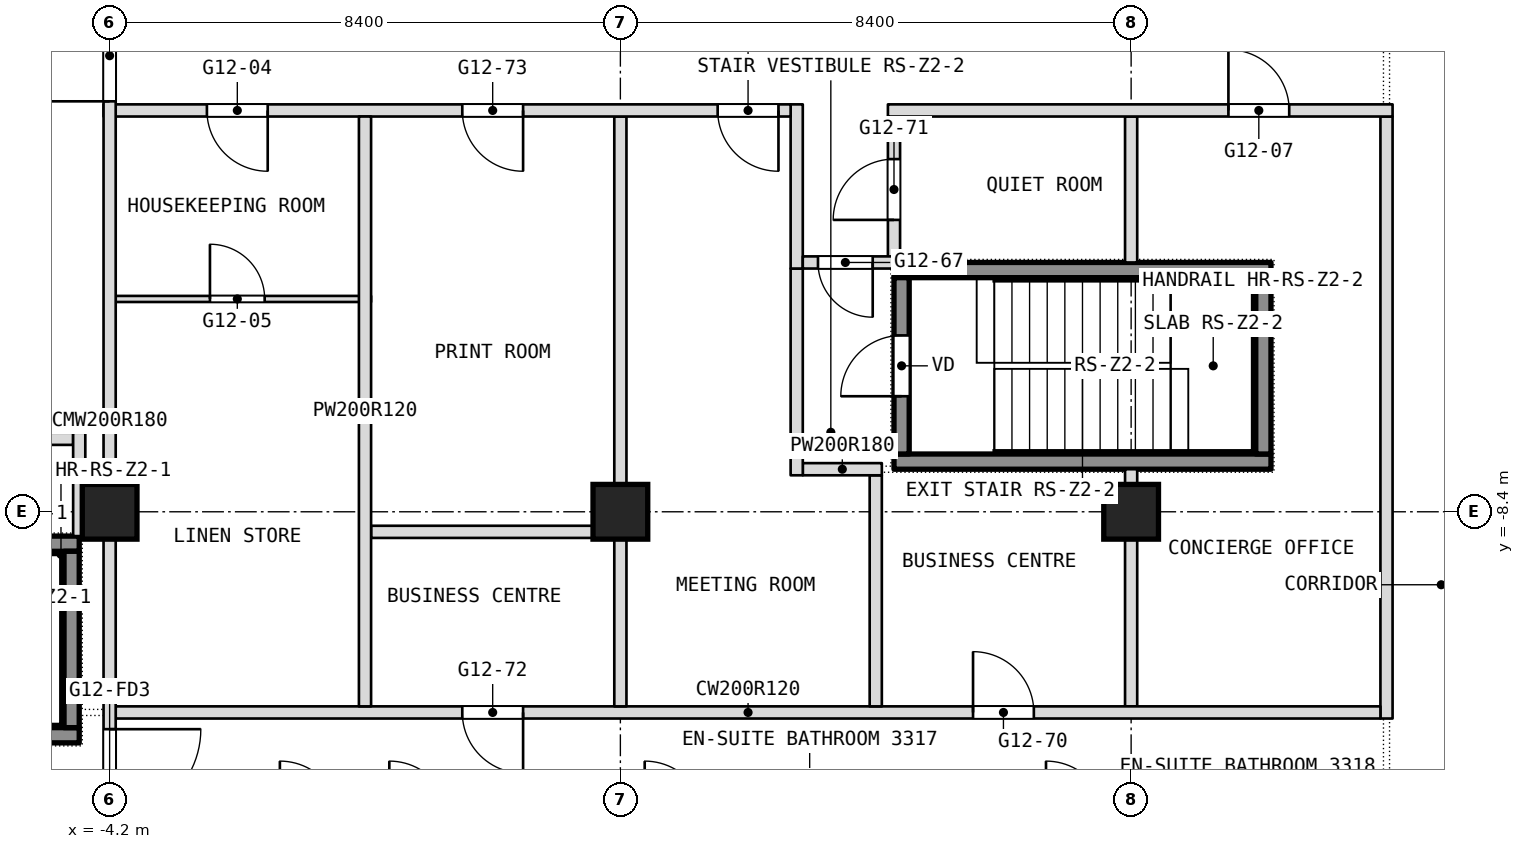
"""IFC4 building model, lengths in metres.
Left out: names, types, materials, properties, quantities, classifications, styles, units other than length and angle.
Written with IfcOpenShell. Run it as: python <this file> out.ifc"""

import sys

from ifc_helpers import new_model, si_unit, direction, frame, frame_2d, origin, origin_2d, place, context, subcontext, project, spatial, rectangle, extrude, element, fill, save


model = new_model("IFC4")
c1 = context("Model", 3, precision=1e-05, world=origin(), true_north=direction((0.0, 1.0)))
c2 = subcontext(c1, "Body", "Model", "MODEL_VIEW")
j1 = project(units=[si_unit("LENGTHUNIT", "METRE"), si_unit("PLANEANGLEUNIT", "RADIAN")], contexts=[c1])
p1 = place(None, origin())
s1 = spatial("IfcSite", under=j1, at=p1, CompositionType="ELEMENT")
p2 = place(p1, origin())
s2 = spatial("IfcBuilding", under=s1, at=p2, CompositionType="ELEMENT")
p3 = place(p2, frame((0.0, 0.0, 144.5)))
s3 = spatial("IfcBuildingStorey", under=s2, at=p3, CompositionType="ELEMENT", Elevation=144.5)
for number, where, z_axis, x_axis in (
    (1, (-4.2, -8.4, 0.0), (0.0, 0.0, 1.0), (1.0, 0.0, 0.0)),
    (2, (4.2, -8.4, 0.0), (0.0, 0.0, 1.0), (1.0, 0.0, 0.0)),
    (3, (12.6, -8.4, 0.0), (0.0, 0.0, 1.0), (1.0, 0.0, 0.0)),
):
    element("IfcColumn", number, at=place(p3, frame(where, z_axis=z_axis, x_axis=x_axis)), inside=s3, PredefinedType="COLUMN", context=c2, shape_type="SweptSolid", body=[
        extrude(rectangle(XDim=0.9, YDim=0.9, at=origin_2d()), origin(), (0.0, 0.0, 1.0), 3.6),
    ])
p4 = place(p3, frame((16.8, -11.8, 0.0), z_axis=(0.0, 0.0, 1.0), x_axis=(0.0, 1.0, 0.0)))
e4 = element("IfcWall", 4, at=p4, inside=s3, PredefinedType="PARTITIONING", context=c2, shape_type="SweptSolid", body=[
    extrude(rectangle(XDim=9.9, YDim=0.2, at=frame_2d((4.95, 0.0))), origin(), (0.0, 0.0, 1.0), 3.34),
])
p5 = place(p3, frame((12.6, -11.6, 0.0), z_axis=(0.0, 0.0, 1.0), x_axis=(0.0, 1.0, 0.0)))
e5 = element("IfcWall", 5, at=p5, inside=s3, PredefinedType="PARTITIONING", context=c2, shape_type="SweptSolid", body=[
    extrude(rectangle(XDim=3.9, YDim=0.2, at=frame_2d((1.95, 0.0))), origin(), (0.0, 0.0, 1.0), 3.34),
])
p6 = place(p3, frame((12.6, -4.3, 0.0), z_axis=(0.0, 0.0, 1.0), x_axis=(0.0, 1.0, 0.0)))
e6 = element("IfcWall", 6, at=p6, inside=s3, PredefinedType="PARTITIONING", context=c2, shape_type="SweptSolid", body=[
    extrude(rectangle(XDim=2.4, YDim=0.2, at=frame_2d((1.2, 0.0))), origin(), (0.0, 0.0, 1.0), 3.34),
])
p7 = place(p3, frame((-4.1, -11.7, 0.0), z_axis=(0.0, 0.0, 1.0), x_axis=(1.0, 0.0, 0.0)))
e7 = element("IfcWall", 7, at=p7, inside=s3, PredefinedType="PARTITIONING", context=c2, shape_type="SweptSolid", body=[
    extrude(rectangle(XDim=20.8, YDim=0.2, at=frame_2d((10.4, 0.0))), origin(), (0.0, 0.0, 1.0), 3.34),
])
p8 = place(p7, frame((14.1, 0.0, 0.0)))
e8 = element("IfcOpeningElement", 8, at=p8, cuts=e7, PredefinedType="OPENING", context=c2, shape_type="SweptSolid", body=[
    extrude(rectangle(XDim=1.0, YDim=2.1, at=frame_2d((0.5, 1.05))), frame((0.0, 0.1, 0.0), z_axis=(0.0, -1.0, 0.0), x_axis=(1.0, 0.0, 0.0)), (0.0, 0.0, 1.0), 0.2),
])
p9 = place(p7, frame((5.7, 0.0, 0.0)))
e9 = element("IfcOpeningElement", 9, at=p9, cuts=e7, PredefinedType="OPENING", context=c2, shape_type="SweptSolid", body=[
    extrude(rectangle(XDim=1.0, YDim=2.1, at=frame_2d((0.5, 1.05))), frame((0.0, 0.1, 0.0), z_axis=(0.0, -1.0, 0.0), x_axis=(1.0, 0.0, 0.0)), (0.0, 0.0, 1.0), 0.2),
])
p10 = place(p3, frame((0.1, -8.73, 0.0), z_axis=(0.0, 0.0, 1.0), x_axis=(1.0, 0.0, 0.0)))
e10 = element("IfcWall", 10, at=p10, inside=s3, PredefinedType="PARTITIONING", context=c2, shape_type="SweptSolid", body=[
    extrude(rectangle(XDim=4.0, YDim=0.2, at=frame_2d((2.0, 0.0))), origin(), (0.0, 0.0, 1.0), 3.34),
])
p11 = place(p3, frame((8.7, -4.3, 0.0), z_axis=(0.0, 0.0, 1.0), x_axis=(0.0, 1.0, 0.0)))
e11 = element("IfcWall", 11, at=p11, inside=s3, PredefinedType="PARTITIONING", context=c2, shape_type="SweptSolid", body=[
    extrude(rectangle(XDim=2.4, YDim=0.2, at=frame_2d((1.2, 0.0))), origin(), (0.0, 0.0, 1.0), 3.34),
])
p12 = place(p11, frame((0.7, 0.0, 0.0)))
e12 = element("IfcOpeningElement", 12, at=p12, cuts=e11, PredefinedType="OPENING", context=c2, shape_type="SweptSolid", body=[
    extrude(rectangle(XDim=1.0, YDim=2.1, at=frame_2d((0.5, 1.05))), frame((0.0, 0.1, 0.0), z_axis=(0.0, -1.0, 0.0), x_axis=(1.0, 0.0, 0.0)), (0.0, 0.0, 1.0), 0.2),
])
p13 = place(p3, frame((8.4, -11.6, 0.0), z_axis=(0.0, 0.0, 1.0), x_axis=(0.0, 1.0, 0.0)))
e13 = element("IfcWall", 13, at=p13, inside=s3, PredefinedType="PARTITIONING", context=c2, shape_type="SweptSolid", body=[
    extrude(rectangle(XDim=3.8, YDim=0.2, at=frame_2d((1.9, 0.0))), origin(), (0.0, 0.0, 1.0), 3.34),
])
p14 = place(p3, frame((7.2, -7.7, 0.0), z_axis=(0.0, 0.0, 1.0), x_axis=(1.0, 0.0, 0.0)))
e14 = element("IfcWall", 14, at=p14, inside=s3, PredefinedType="PARTITIONING", context=c2, shape_type="SweptSolid", body=[
    extrude(rectangle(XDim=1.3, YDim=0.2, at=frame_2d((0.65, 0.0))), origin(), (0.0, 0.0, 1.0), 3.34),
])
p15 = place(p3, frame((-8.5, -7.2, 0.0), z_axis=(0.0, 0.0, 1.0), x_axis=(1.0, 0.0, 0.0)))
e15 = element("IfcWall", 15, at=p15, inside=s3, PredefinedType="PARTITIONING", context=c2, shape_type="SweptSolid", body=[
    extrude(rectangle(XDim=3.7, YDim=0.2, at=frame_2d((1.85, 0.0))), origin(), (0.0, 0.0, 1.0), 3.34),
])
p16 = place(p15, frame((0.25, 0.0, 0.0)))
e16 = element("IfcOpeningElement", 16, at=p16, cuts=e15, PredefinedType="OPENING", context=c2, shape_type="SweptSolid", body=[
    extrude(rectangle(XDim=0.9, YDim=2.1, at=frame_2d((0.45, 1.05))), frame((0.0, 0.1, 0.0), z_axis=(0.0, -1.0, 0.0), x_axis=(1.0, 0.0, 0.0)), (0.0, 0.0, 1.0), 0.2),
])
p17 = place(p3, frame((7.1, -7.8, 0.0), z_axis=(0.0, 0.0, 1.0), x_axis=(0.0, 1.0, 0.0)))
e17 = element("IfcWall", 17, at=p17, inside=s3, PredefinedType="PARTITIONING", context=c2, shape_type="SweptSolid", body=[
    extrude(rectangle(XDim=3.4, YDim=0.2, at=frame_2d((1.7, 0.0))), origin(), (0.0, 0.0, 1.0), 3.34),
])
p18 = place(p3, frame((7.1, -4.4, 0.0), z_axis=(0.0, 0.0, 1.0), x_axis=(0.0, 1.0, 0.0)))
e18 = element("IfcWall", 18, at=p18, inside=s3, PredefinedType="PARTITIONING", context=c2, shape_type="SweptSolid", body=[
    extrude(rectangle(XDim=2.7, YDim=0.2, at=frame_2d((1.35, 0.0))), origin(), (0.0, 0.0, 1.0), 3.34),
])
p19 = place(p3, frame((-4.1, -4.9, 0.0), z_axis=(0.0, 0.0, 1.0), x_axis=(1.0, 0.0, 0.0)))
e19 = element("IfcWall", 19, at=p19, inside=s3, PredefinedType="PARTITIONING", context=c2, shape_type="SweptSolid", body=[
    extrude(rectangle(XDim=4.2, YDim=0.1, at=frame_2d((2.1, 0.0))), origin(), (0.0, 0.0, 1.0), 3.34),
])
p20 = place(p19, frame((1.55, 0.0, 0.0)))
e20 = element("IfcOpeningElement", 20, at=p20, cuts=e19, PredefinedType="OPENING", context=c2, shape_type="SweptSolid", body=[
    extrude(rectangle(XDim=0.9, YDim=2.1, at=frame_2d((0.45, 1.05))), frame((0.0, 0.05, 0.0), z_axis=(0.0, -1.0, 0.0), x_axis=(1.0, 0.0, 0.0)), (0.0, 0.0, 1.0), 0.1),
])
p21 = place(p3, frame((7.2, -4.3, 0.0), z_axis=(0.0, 0.0, 1.0), x_axis=(1.0, 0.0, 0.0)))
e21 = element("IfcWall", 21, at=p21, inside=s3, PredefinedType="PARTITIONING", context=c2, shape_type="SweptSolid", body=[
    extrude(rectangle(XDim=1.5, YDim=0.2, at=frame_2d((0.75, 0.0))), origin(), (0.0, 0.0, 1.0), 3.34),
])
p22 = place(p21, frame((0.25, 0.0, 0.0)))
e22 = element("IfcOpeningElement", 22, at=p22, cuts=e21, PredefinedType="OPENING", context=c2, shape_type="SweptSolid", body=[
    extrude(rectangle(XDim=0.9, YDim=2.1, at=frame_2d((0.45, 1.05))), frame((0.0, 0.1, 0.0), z_axis=(0.0, -1.0, 0.0), x_axis=(1.0, 0.0, 0.0)), (0.0, 0.0, 1.0), 0.2),
])
p23 = place(p3, frame((4.2, -11.6, 0.0), z_axis=(0.0, 0.0, 1.0), x_axis=(0.0, 1.0, 0.0)))
e23 = element("IfcWall", 23, at=p23, inside=s3, PredefinedType="PARTITIONING", context=c2, shape_type="SweptSolid", body=[
    extrude(rectangle(XDim=9.7, YDim=0.2, at=frame_2d((4.85, 0.0))), origin(), (0.0, 0.0, 1.0), 3.34),
])
p24 = place(p3, frame((-4.3, -1.8, 0.0), z_axis=(0.0, 0.0, 1.0), x_axis=(1.0, 0.0, 0.0)))
e24 = element("IfcWall", 24, at=p24, inside=s3, PredefinedType="PARTITIONING", context=c2, shape_type="SweptSolid", body=[
    extrude(rectangle(XDim=11.3, YDim=0.2, at=frame_2d((5.65, 0.0))), origin(), (0.0, 0.0, 1.0), 3.34),
])
p25 = place(p24, frame((1.7, 0.0, 0.0)))
e25 = element("IfcOpeningElement", 25, at=p25, cuts=e24, PredefinedType="OPENING", context=c2, shape_type="SweptSolid", body=[
    extrude(rectangle(XDim=1.0, YDim=2.1, at=frame_2d((0.5, 1.05))), frame((0.0, 0.1, 0.0), z_axis=(0.0, -1.0, 0.0), x_axis=(1.0, 0.0, 0.0)), (0.0, 0.0, 1.0), 0.2),
])
p26 = place(p24, frame((10.1, 0.0, 0.0)))
e26 = element("IfcOpeningElement", 26, at=p26, cuts=e24, PredefinedType="OPENING", context=c2, shape_type="SweptSolid", body=[
    extrude(rectangle(XDim=1.0, YDim=2.1, at=frame_2d((0.5, 1.05))), frame((0.0, 0.1, 0.0), z_axis=(0.0, -1.0, 0.0), x_axis=(1.0, 0.0, 0.0)), (0.0, 0.0, 1.0), 0.2),
])
p27 = place(p24, frame((5.9, 0.0, 0.0)))
e27 = element("IfcOpeningElement", 27, at=p27, cuts=e24, PredefinedType="OPENING", context=c2, shape_type="SweptSolid", body=[
    extrude(rectangle(XDim=1.0, YDim=2.1, at=frame_2d((0.5, 1.05))), frame((0.0, 0.1, 0.0), z_axis=(0.0, -1.0, 0.0), x_axis=(1.0, 0.0, 0.0)), (0.0, 0.0, 1.0), 0.2),
])
p28 = place(p3, frame((8.6, -1.8, 0.0), z_axis=(0.0, 0.0, 1.0), x_axis=(1.0, 0.0, 0.0)))
e28 = element("IfcWall", 28, at=p28, inside=s3, PredefinedType="PARTITIONING", context=c2, shape_type="SweptSolid", body=[
    extrude(rectangle(XDim=8.3, YDim=0.2, at=frame_2d((4.15, 0.0))), origin(), (0.0, 0.0, 1.0), 3.34),
])
p29 = place(p28, frame((5.6, 0.0, 0.0)))
e29 = element("IfcOpeningElement", 29, at=p29, cuts=e28, PredefinedType="OPENING", context=c2, shape_type="SweptSolid", body=[
    extrude(rectangle(XDim=1.0, YDim=2.1, at=frame_2d((0.5, 1.05))), frame((0.0, 0.1, 0.0), z_axis=(0.0, -1.0, 0.0), x_axis=(1.0, 0.0, 0.0)), (0.0, 0.0, 1.0), 0.2),
])
p30 = place(p3, frame((0.0, -11.6, 0.0), z_axis=(0.0, 0.0, 1.0), x_axis=(0.0, 1.0, 0.0)))
e30 = element("IfcWall", 30, at=p30, inside=s3, PredefinedType="PARTITIONING", context=c2, shape_type="SweptSolid", body=[
    extrude(rectangle(XDim=9.7, YDim=0.2, at=frame_2d((4.85, 0.0))), origin(), (0.0, 0.0, 1.0), 3.34),
])
p31 = place(p3, frame((-4.2, -13.8, 0.0), z_axis=(0.0, 0.0, 1.0), x_axis=(0.0, 1.0, 0.0)))
e31 = element("IfcWall", 31, at=p31, inside=s3, PredefinedType="PARTITIONING", context=c2, shape_type="SweptSolid", body=[
    extrude(rectangle(XDim=13.8, YDim=0.2, at=frame_2d((6.9, 0.0))), origin(), (0.0, 0.0, 1.0), 3.34),
])
p32 = place(p31, frame((12.15, 0.0, 0.0)))
e32 = element("IfcOpeningElement", 32, at=p32, cuts=e31, PredefinedType="OPENING", context=c2, shape_type="SweptSolid", body=[
    extrude(rectangle(XDim=1.5, YDim=2.1, at=frame_2d((0.75, 1.05))), frame((0.0, 0.1, 0.0), z_axis=(0.0, -1.0, 0.0), x_axis=(1.0, 0.0, 0.0)), (0.0, 0.0, 1.0), 0.2),
])
p33 = place(p31, frame((0.325, 0.0, 0.0)))
e33 = element("IfcOpeningElement", 33, at=p33, cuts=e31, PredefinedType="OPENING", context=c2, shape_type="SweptSolid", body=[
    extrude(rectangle(XDim=1.5, YDim=2.1, at=frame_2d((0.75, 1.05))), frame((0.0, 0.1, 0.0), z_axis=(0.0, -1.0, 0.0), x_axis=(1.0, 0.0, 0.0)), (0.0, 0.0, 1.0), 0.2),
])
p34 = place(p3, frame((-4.7, -8.8, 0.0), z_axis=(0.0, 0.0, 1.0), x_axis=(0.0, 1.0, 0.0)))
e34 = element("IfcWall", 34, at=p34, inside=s3, PredefinedType="PARTITIONING", context=c2, shape_type="SweptSolid", body=[
    extrude(rectangle(XDim=1.7, YDim=0.2, at=frame_2d((0.85, 0.0))), origin(), (0.0, 0.0, 1.0), 3.34),
])
p35 = place(p3, frame((-10.9, -12.075, 0.1), z_axis=(0.0, 0.0, 1.0), x_axis=(1.0, 0.0, 0.0)))
e35 = element("IfcWall", 35, at=p35, inside=s3, PredefinedType="SHEAR", context=c2, shape_type="SweptSolid", body=[
    extrude(rectangle(XDim=6.2, YDim=0.25, at=frame_2d((3.1, 0.0))), origin(), (0.0, 0.0, 1.0), 3.6),
])
p36 = place(p3, frame((-10.9, -8.925, 0.1), z_axis=(0.0, 0.0, 1.0), x_axis=(1.0, 0.0, 0.0)))
e36 = element("IfcWall", 36, at=p36, inside=s3, PredefinedType="SHEAR", context=c2, shape_type="SweptSolid", body=[
    extrude(rectangle(XDim=6.2, YDim=0.25, at=frame_2d((3.1, 0.0))), origin(), (0.0, 0.0, 1.0), 3.6),
])
p37 = place(p36, frame((0.45, 0.0, 0.0)))
e37 = element("IfcOpeningElement", 37, at=p37, cuts=e36, PredefinedType="OPENING", context=c2, shape_type="SweptSolid", body=[
    extrude(rectangle(XDim=1.0, YDim=2.1, at=frame_2d((0.5, 1.05))), frame((0.0, 0.125, 0.0), z_axis=(0.0, -1.0, 0.0), x_axis=(1.0, 0.0, 0.0)), (0.0, 0.0, 1.0), 0.25),
])
p38 = place(p3, frame((-4.825, -11.95, 0.1), z_axis=(0.0, 0.0, 1.0), x_axis=(0.0, 1.0, 0.0)))
e38 = element("IfcWall", 38, at=p38, inside=s3, PredefinedType="SHEAR", context=c2, shape_type="SweptSolid", body=[
    extrude(rectangle(XDim=2.9, YDim=0.25, at=frame_2d((1.45, 0.0))), origin(), (0.0, 0.0, 1.0), 3.6),
])
for number, where, z_axis, x_axis in (
    (39, (8.7, -7.575, 0.1), (0.0, 0.0, 1.0), (1.0, 0.0, 0.0)),
    (40, (8.7, -4.425, 0.1), (0.0, 0.0, 1.0), (1.0, 0.0, 0.0)),
):
    element("IfcWall", number, at=place(p3, frame(where, z_axis=z_axis, x_axis=x_axis)), inside=s3, PredefinedType="SHEAR", context=c2, shape_type="SweptSolid", body=[
        extrude(rectangle(XDim=6.2, YDim=0.25, at=frame_2d((3.1, 0.0))), origin(), (0.0, 0.0, 1.0), 3.6),
    ])
p39 = place(p3, frame((8.825, -7.45, 0.1), z_axis=(0.0, 0.0, 1.0), x_axis=(0.0, 1.0, 0.0)))
e41 = element("IfcWall", 41, at=p39, inside=s3, PredefinedType="SHEAR", context=c2, shape_type="SweptSolid", body=[
    extrude(rectangle(XDim=2.9, YDim=0.25, at=frame_2d((1.45, 0.0))), origin(), (0.0, 0.0, 1.0), 3.6),
])
p40 = place(p39, frame((0.95, 0.0, 0.0)))
e42 = element("IfcOpeningElement", 42, at=p40, cuts=e41, PredefinedType="OPENING", context=c2, shape_type="SweptSolid", body=[
    extrude(rectangle(XDim=1.0, YDim=2.1, at=frame_2d((0.5, 1.05))), frame((0.0, 0.125, 0.0), z_axis=(0.0, -1.0, 0.0), x_axis=(1.0, 0.0, 0.0)), (0.0, 0.0, 1.0), 0.25),
])
p41 = place(p3, frame((14.775, -7.45, 0.1), z_axis=(0.0, 0.0, 1.0), x_axis=(0.0, 1.0, 0.0)))
e43 = element("IfcWall", 43, at=p41, inside=s3, PredefinedType="SHEAR", context=c2, shape_type="SweptSolid", body=[
    extrude(rectangle(XDim=2.9, YDim=0.25, at=frame_2d((1.45, 0.0))), origin(), (0.0, 0.0, 1.0), 3.6),
])
p42 = place(p8, origin())
e44 = element("IfcDoor", 44, at=p42, inside=s3, OperationType="SINGLE_SWING_RIGHT", PredefinedType="DOOR", context=c2, shape_type="SweptSolid", body=[
    extrude(rectangle(XDim=1.0, YDim=2.1, at=frame_2d((0.5, 1.05))), frame((0.0, 0.025, 0.0), z_axis=(0.0, -1.0, 0.0), x_axis=(1.0, 0.0, 0.0)), (0.0, 0.0, 1.0), 0.05),
])
fill(e8, e44)
p43 = place(p9, origin())
e45 = element("IfcDoor", 45, at=p43, inside=s3, OperationType="SINGLE_SWING_RIGHT", PredefinedType="DOOR", context=c2, shape_type="SweptSolid", body=[
    extrude(rectangle(XDim=1.0, YDim=2.1, at=frame_2d((0.5, 1.05))), frame((0.0, 0.025, 0.0), z_axis=(0.0, -1.0, 0.0), x_axis=(1.0, 0.0, 0.0)), (0.0, 0.0, 1.0), 0.05),
])
fill(e9, e45)
p44 = place(p12, origin())
e46 = element("IfcDoor", 46, at=p44, inside=s3, OperationType="SINGLE_SWING_LEFT", PredefinedType="DOOR", context=c2, shape_type="SweptSolid", body=[
    extrude(rectangle(XDim=1.0, YDim=2.1, at=frame_2d((0.5, 1.05))), frame((0.0, 0.025, 0.0), z_axis=(0.0, -1.0, 0.0), x_axis=(1.0, 0.0, 0.0)), (0.0, 0.0, 1.0), 0.05),
])
fill(e12, e46)
p45 = place(p20, origin())
e47 = element("IfcDoor", 47, at=p45, inside=s3, OperationType="SINGLE_SWING_LEFT", PredefinedType="DOOR", context=c2, shape_type="SweptSolid", body=[
    extrude(rectangle(XDim=0.9, YDim=2.1, at=frame_2d((0.45, 1.05))), frame((0.0, 0.025, 0.0), z_axis=(0.0, -1.0, 0.0), x_axis=(1.0, 0.0, 0.0)), (0.0, 0.0, 1.0), 0.05),
])
fill(e20, e47)
p46 = place(p22, origin())
e48 = element("IfcDoor", 48, at=p46, inside=s3, OperationType="SINGLE_SWING_LEFT", PredefinedType="DOOR", context=c2, shape_type="SweptSolid", body=[
    extrude(rectangle(XDim=0.9, YDim=2.1, at=frame_2d((0.45, 1.05))), frame((0.0, 0.025, 0.0), z_axis=(0.0, -1.0, 0.0), x_axis=(1.0, 0.0, 0.0)), (0.0, 0.0, 1.0), 0.05),
])
fill(e22, e48)
p47 = place(p25, origin())
e49 = element("IfcDoor", 49, at=p47, inside=s3, OperationType="SINGLE_SWING_RIGHT", PredefinedType="DOOR", context=c2, shape_type="SweptSolid", body=[
    extrude(rectangle(XDim=1.0, YDim=2.1, at=frame_2d((0.5, 1.05))), frame((0.0, 0.025, 0.0), z_axis=(0.0, -1.0, 0.0), x_axis=(1.0, 0.0, 0.0)), (0.0, 0.0, 1.0), 0.05),
])
fill(e25, e49)
p48 = place(p26, origin())
e50 = element("IfcDoor", 50, at=p48, inside=s3, OperationType="SINGLE_SWING_LEFT", PredefinedType="DOOR", context=c2, shape_type="SweptSolid", body=[
    extrude(rectangle(XDim=1.0, YDim=2.1, at=frame_2d((0.5, 1.05))), frame((0.0, 0.025, 0.0), z_axis=(0.0, -1.0, 0.0), x_axis=(1.0, 0.0, 0.0)), (0.0, 0.0, 1.0), 0.05),
])
fill(e26, e50)
p49 = place(p27, origin())
e51 = element("IfcDoor", 51, at=p49, inside=s3, OperationType="SINGLE_SWING_LEFT", PredefinedType="DOOR", context=c2, shape_type="SweptSolid", body=[
    extrude(rectangle(XDim=1.0, YDim=2.1, at=frame_2d((0.5, 1.05))), frame((0.0, 0.025, 0.0), z_axis=(0.0, -1.0, 0.0), x_axis=(1.0, 0.0, 0.0)), (0.0, 0.0, 1.0), 0.05),
])
fill(e27, e51)
p50 = place(p29, origin())
e52 = element("IfcDoor", 52, at=p50, inside=s3, OperationType="SINGLE_SWING_LEFT", PredefinedType="DOOR", context=c2, shape_type="SweptSolid", body=[
    extrude(rectangle(XDim=1.0, YDim=2.1, at=frame_2d((0.5, 1.05))), frame((0.0, 0.025, 0.0), z_axis=(0.0, -1.0, 0.0), x_axis=(1.0, 0.0, 0.0)), (0.0, 0.0, 1.0), 0.05),
])
fill(e29, e52)
p51 = place(p40, origin())
e53 = element("IfcDoor", 53, at=p51, inside=s3, OperationType="SINGLE_SWING_LEFT", PredefinedType="DOOR", context=c2, shape_type="SweptSolid", body=[
    extrude(rectangle(XDim=1.0, YDim=2.1, at=frame_2d((0.5, 1.05))), frame((0.0, 0.025, 0.0), z_axis=(0.0, -1.0, 0.0), x_axis=(1.0, 0.0, 0.0)), (0.0, 0.0, 1.0), 0.05),
])
fill(e42, e53)
p52 = place(p32, origin())
e54 = element("IfcDoor", 54, at=p52, inside=s3, OperationType="DOUBLE_DOOR_DOUBLE_SWING", PredefinedType="DOOR", context=c2, shape_type="SweptSolid", body=[
    extrude(rectangle(XDim=1.5, YDim=2.1, at=frame_2d((0.75, 1.05))), frame((0.0, 0.025, 0.0), z_axis=(0.0, -1.0, 0.0), x_axis=(1.0, 0.0, 0.0)), (0.0, 0.0, 1.0), 0.05),
])
fill(e32, e54)
p53 = place(p33, origin())
e55 = element("IfcDoor", 55, at=p53, inside=s3, OperationType="DOUBLE_DOOR_DOUBLE_SWING", PredefinedType="DOOR", context=c2, shape_type="SweptSolid", body=[
    extrude(rectangle(XDim=1.5, YDim=2.1, at=frame_2d((0.75, 1.05))), frame((0.0, 0.025, 0.0), z_axis=(0.0, -1.0, 0.0), x_axis=(1.0, 0.0, 0.0)), (0.0, 0.0, 1.0), 0.05),
])
fill(e33, e55)
save(model, sys.argv[1])
